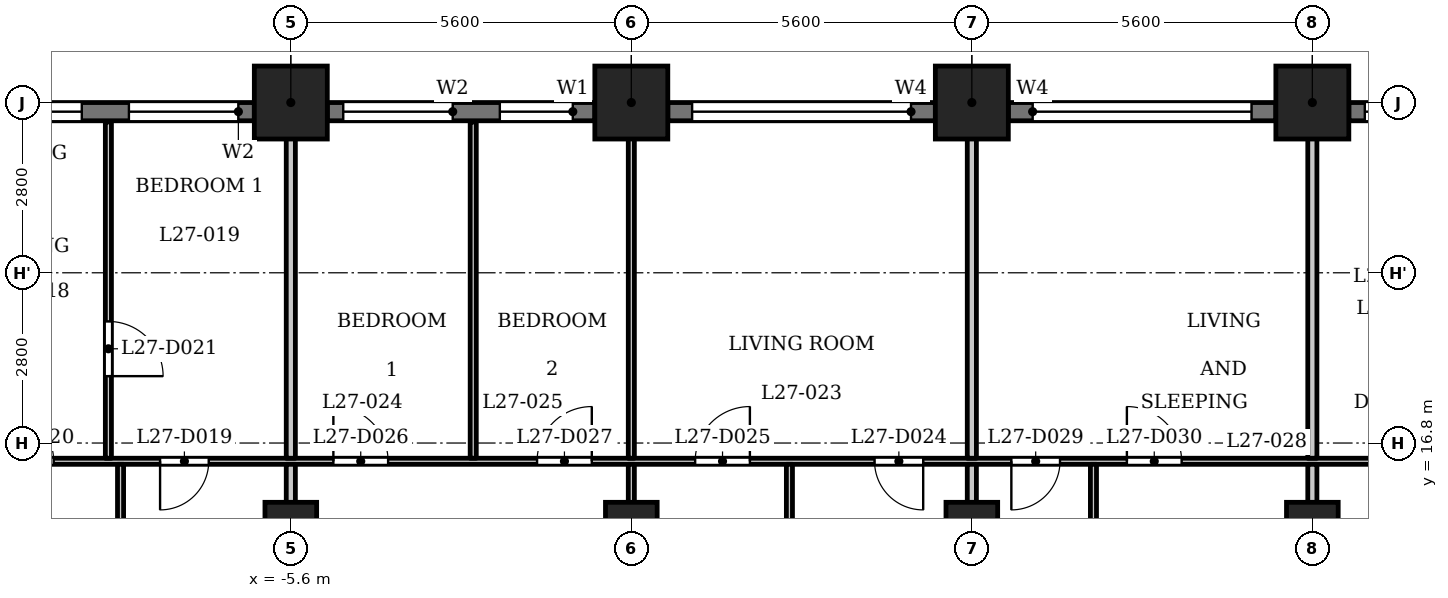
"""IFC4 building model, lengths in metres.
Left out: names, types, materials, properties, quantities, classifications, styles, units other than length and angle.
Written with IfcOpenShell. Run it as: python <this file> out.ifc"""

import sys

from ifc_helpers import new_model, si_unit, direction, frame, frame_2d, origin, origin_2d, place, context, subcontext, project, spatial, rectangle, extrude, element, fill, save


model = new_model("IFC4")
c1 = context("Model", 3, precision=1e-05, world=origin(), true_north=direction((0.0, 1.0)))
c2 = subcontext(c1, "Body", "Model", "MODEL_VIEW")
j1 = project(units=[si_unit("LENGTHUNIT", "METRE"), si_unit("PLANEANGLEUNIT", "RADIAN")], contexts=[c1])
p1 = place(None, origin())
s1 = spatial("IfcSite", under=j1, at=p1, CompositionType="ELEMENT")
p2 = place(p1, origin())
s2 = spatial("IfcBuilding", under=s1, at=p2, CompositionType="ELEMENT")
p3 = place(p2, frame((0.0, 0.0, 107.8)))
s3 = spatial("IfcBuildingStorey", under=s2, at=p3, CompositionType="ELEMENT", Elevation=107.8)
for number, where, z_axis, x_axis in (
    (1, (11.2, 22.4, 0.0), (0.0, 0.0, 1.0), (1.0, 0.0, 0.0)),
    (2, (5.6, 22.4, 0.0), (0.0, 0.0, 1.0), (1.0, 0.0, 0.0)),
    (3, (0.0, 22.4, 0.0), (0.0, 0.0, 1.0), (1.0, 0.0, 0.0)),
    (4, (-5.6, 22.4, 0.0), (0.0, 0.0, 1.0), (1.0, 0.0, 0.0)),
):
    element("IfcColumn", number, at=place(p3, frame(where, z_axis=z_axis, x_axis=x_axis)), inside=s3, PredefinedType="COLUMN", context=c2, shape_type="SweptSolid", body=[
        extrude(rectangle(XDim=1.2, YDim=1.2, at=origin_2d()), origin(), (0.0, 0.0, 1.0), 3.5),
    ])
for number, where, z_axis, x_axis in (
    (5, (-5.6, 15.4, 0.0), (0.0, 0.0, 1.0), (1.0, 0.0, 0.0)),
    (6, (0.0, 15.4, 0.0), (0.0, 0.0, 1.0), (1.0, 0.0, 0.0)),
    (7, (5.6, 15.4, 0.0), (0.0, 0.0, 1.0), (1.0, 0.0, 0.0)),
    (8, (11.2, 15.4, 0.0), (0.0, 0.0, 1.0), (1.0, 0.0, 0.0)),
):
    element("IfcColumn", number, at=place(p3, frame(where, z_axis=z_axis, x_axis=x_axis)), inside=s3, PredefinedType="COLUMN", context=c2, shape_type="SweptSolid", body=[
        extrude(rectangle(XDim=0.85, YDim=0.85, at=origin_2d()), origin(), (0.0, 0.0, 1.0), 3.5),
    ])
p4 = place(p3, frame((16.2, 22.25, 0.0), z_axis=(0.0, 0.0, 1.0), x_axis=(-1.0, 0.0, 0.0)))
e9 = element("IfcWall", 9, at=p4, inside=s3, PredefinedType="SOLIDWALL", context=c2, shape_type="SweptSolid", body=[
    extrude(rectangle(XDim=4.4, YDim=0.3, at=frame_2d((2.2, 0.0))), origin(), (0.0, 0.0, 1.0), 2.4),
])
p5 = place(p4, frame((0.363, 0.0, 0.6)))
e10 = element("IfcOpeningElement", 10, at=p5, cuts=e9, PredefinedType="OPENING", context=c2, shape_type="SweptSolid", body=[
    extrude(rectangle(XDim=1.2, YDim=1.55, at=frame_2d((0.6, 0.775))), frame((0.0, 0.16, 0.0), z_axis=(0.0, -1.0, 0.0), x_axis=(1.0, 0.0, 0.0)), (0.0, 0.0, 1.0), 0.32),
])
p6 = place(p4, frame((2.337, 0.0, 0.9)))
e11 = element("IfcOpeningElement", 11, at=p6, cuts=e9, PredefinedType="OPENING", context=c2, shape_type="SweptSolid", body=[
    extrude(rectangle(XDim=1.8, YDim=1.25, at=frame_2d((0.9, 0.625))), frame((0.0, 0.16, 0.0), z_axis=(0.0, -1.0, 0.0), x_axis=(1.0, 0.0, 0.0)), (0.0, 0.0, 1.0), 0.32),
])
p7 = place(p3, frame((10.6, 22.25, 0.0), z_axis=(0.0, 0.0, 1.0), x_axis=(-1.0, 0.0, 0.0)))
e12 = element("IfcWall", 12, at=p7, inside=s3, PredefinedType="SOLIDWALL", context=c2, shape_type="SweptSolid", body=[
    extrude(rectangle(XDim=4.4, YDim=0.3, at=frame_2d((2.2, 0.0))), origin(), (0.0, 0.0, 1.0), 2.4),
])
p8 = place(p7, frame((0.4, 0.0, 1.2)))
e13 = element("IfcOpeningElement", 13, at=p8, cuts=e12, PredefinedType="OPENING", context=c2, shape_type="SweptSolid", body=[
    extrude(rectangle(XDim=3.6, YDim=0.95, at=frame_2d((1.8, 0.475))), frame((0.0, 0.16, 0.0), z_axis=(0.0, -1.0, 0.0), x_axis=(1.0, 0.0, 0.0)), (0.0, 0.0, 1.0), 0.32),
])
p9 = place(p3, frame((5.0, 22.25, 0.0), z_axis=(0.0, 0.0, 1.0), x_axis=(-1.0, 0.0, 0.0)))
e14 = element("IfcWall", 14, at=p9, inside=s3, PredefinedType="SOLIDWALL", context=c2, shape_type="SweptSolid", body=[
    extrude(rectangle(XDim=4.4, YDim=0.3, at=frame_2d((2.2, 0.0))), origin(), (0.0, 0.0, 1.0), 2.4),
])
p10 = place(p9, frame((0.4, 0.0, 1.2)))
e15 = element("IfcOpeningElement", 15, at=p10, cuts=e14, PredefinedType="OPENING", context=c2, shape_type="SweptSolid", body=[
    extrude(rectangle(XDim=3.6, YDim=0.95, at=frame_2d((1.8, 0.475))), frame((0.0, 0.16, 0.0), z_axis=(0.0, -1.0, 0.0), x_axis=(1.0, 0.0, 0.0)), (0.0, 0.0, 1.0), 0.32),
])
p11 = place(p3, frame((-0.6, 22.25, 0.0), z_axis=(0.0, 0.0, 1.0), x_axis=(-1.0, 0.0, 0.0)))
e16 = element("IfcWall", 16, at=p11, inside=s3, PredefinedType="SOLIDWALL", context=c2, shape_type="SweptSolid", body=[
    extrude(rectangle(XDim=4.4, YDim=0.3, at=frame_2d((2.2, 0.0))), origin(), (0.0, 0.0, 1.0), 2.4),
])
p12 = place(p11, frame((0.363, 0.0, 0.6)))
e17 = element("IfcOpeningElement", 17, at=p12, cuts=e16, PredefinedType="OPENING", context=c2, shape_type="SweptSolid", body=[
    extrude(rectangle(XDim=1.2, YDim=1.55, at=frame_2d((0.6, 0.775))), frame((0.0, 0.16, 0.0), z_axis=(0.0, -1.0, 0.0), x_axis=(1.0, 0.0, 0.0)), (0.0, 0.0, 1.0), 0.32),
])
p13 = place(p11, frame((2.337, 0.0, 0.9)))
e18 = element("IfcOpeningElement", 18, at=p13, cuts=e16, PredefinedType="OPENING", context=c2, shape_type="SweptSolid", body=[
    extrude(rectangle(XDim=1.8, YDim=1.25, at=frame_2d((0.9, 0.625))), frame((0.0, 0.16, 0.0), z_axis=(0.0, -1.0, 0.0), x_axis=(1.0, 0.0, 0.0)), (0.0, 0.0, 1.0), 0.32),
])
p14 = place(p3, frame((-6.2, 22.25, 0.0), z_axis=(0.0, 0.0, 1.0), x_axis=(-1.0, 0.0, 0.0)))
e19 = element("IfcWall", 19, at=p14, inside=s3, PredefinedType="SOLIDWALL", context=c2, shape_type="SweptSolid", body=[
    extrude(rectangle(XDim=4.4, YDim=0.3, at=frame_2d((2.2, 0.0))), origin(), (0.0, 0.0, 1.0), 2.4),
])
p15 = place(p14, frame((0.262, 0.0, 0.9)))
e20 = element("IfcOpeningElement", 20, at=p15, cuts=e19, PredefinedType="OPENING", context=c2, shape_type="SweptSolid", body=[
    extrude(rectangle(XDim=1.8, YDim=1.25, at=frame_2d((0.9, 0.625))), frame((0.0, 0.16, 0.0), z_axis=(0.0, -1.0, 0.0), x_axis=(1.0, 0.0, 0.0)), (0.0, 0.0, 1.0), 0.32),
])
p16 = place(p14, frame((2.837, 0.0, 0.6)))
e21 = element("IfcOpeningElement", 21, at=p16, cuts=e19, PredefinedType="OPENING", context=c2, shape_type="SweptSolid", body=[
    extrude(rectangle(XDim=1.2, YDim=1.55, at=frame_2d((0.6, 0.775))), frame((0.0, 0.16, 0.0), z_axis=(0.0, -1.0, 0.0), x_axis=(1.0, 0.0, 0.0)), (0.0, 0.0, 1.0), 0.32),
])
p17 = place(p3, frame((-16.725, 16.5, 0.0), z_axis=(0.0, 0.0, 1.0), x_axis=(1.0, 0.0, 0.0)))
e22 = element("IfcWall", 22, at=p17, inside=s3, PredefinedType="PARTITIONING", context=c2, shape_type="SweptSolid", body=[
    extrude(rectangle(XDim=33.45, YDim=0.1, at=frame_2d((16.725, 0.0))), origin(), (0.0, 0.0, 1.0), 3.2),
])
p18 = place(p17, frame((1.075, 0.0, 0.0)))
e23 = element("IfcOpeningElement", 23, at=p18, cuts=e22, PredefinedType="OPENING", context=c2, shape_type="SweptSolid", body=[
    extrude(rectangle(XDim=0.8, YDim=2.1, at=frame_2d((0.4, 1.05))), frame((0.0, 0.06, 0.0), z_axis=(0.0, -1.0, 0.0), x_axis=(1.0, 0.0, 0.0)), (0.0, 0.0, 1.0), 0.12),
])
p19 = place(p17, frame((3.975, 0.0, 0.0)))
e24 = element("IfcOpeningElement", 24, at=p19, cuts=e22, PredefinedType="OPENING", context=c2, shape_type="SweptSolid", body=[
    extrude(rectangle(XDim=0.9, YDim=2.1, at=frame_2d((0.45, 1.05))), frame((0.0, 0.06, 0.0), z_axis=(0.0, -1.0, 0.0), x_axis=(1.0, 0.0, 0.0)), (0.0, 0.0, 1.0), 0.12),
])
p20 = place(p17, frame((8.975, 0.0, 0.0)))
e25 = element("IfcOpeningElement", 25, at=p20, cuts=e22, PredefinedType="OPENING", context=c2, shape_type="SweptSolid", body=[
    extrude(rectangle(XDim=0.8, YDim=2.1, at=frame_2d((0.4, 1.05))), frame((0.0, 0.06, 0.0), z_axis=(0.0, -1.0, 0.0), x_axis=(1.0, 0.0, 0.0)), (0.0, 0.0, 1.0), 0.12),
])
p21 = place(p17, frame((6.325, 0.0, 0.0)))
e26 = element("IfcOpeningElement", 26, at=p21, cuts=e22, PredefinedType="OPENING", context=c2, shape_type="SweptSolid", body=[
    extrude(rectangle(XDim=0.9, YDim=2.1, at=frame_2d((0.45, 1.05))), frame((0.0, 0.06, 0.0), z_axis=(0.0, -1.0, 0.0), x_axis=(1.0, 0.0, 0.0)), (0.0, 0.0, 1.0), 0.12),
])
p22 = place(p17, frame((20.725, 0.0, 0.0)))
e27 = element("IfcOpeningElement", 27, at=p22, cuts=e22, PredefinedType="OPENING", context=c2, shape_type="SweptSolid", body=[
    extrude(rectangle(XDim=0.8, YDim=2.1, at=frame_2d((0.4, 1.05))), frame((0.0, 0.06, 0.0), z_axis=(0.0, -1.0, 0.0), x_axis=(1.0, 0.0, 0.0)), (0.0, 0.0, 1.0), 0.12),
])
p23 = place(p17, frame((17.775, 0.0, 0.0)))
e28 = element("IfcOpeningElement", 28, at=p23, cuts=e22, PredefinedType="OPENING", context=c2, shape_type="SweptSolid", body=[
    extrude(rectangle(XDim=0.9, YDim=2.1, at=frame_2d((0.45, 1.05))), frame((0.0, 0.06, 0.0), z_axis=(0.0, -1.0, 0.0), x_axis=(1.0, 0.0, 0.0)), (0.0, 0.0, 1.0), 0.12),
])
p24 = place(p17, frame((11.825, 0.0, 0.0)))
e29 = element("IfcOpeningElement", 29, at=p24, cuts=e22, PredefinedType="OPENING", context=c2, shape_type="SweptSolid", body=[
    extrude(rectangle(XDim=0.9, YDim=2.1, at=frame_2d((0.45, 1.05))), frame((0.0, 0.06, 0.0), z_axis=(0.0, -1.0, 0.0), x_axis=(1.0, 0.0, 0.0)), (0.0, 0.0, 1.0), 0.12),
])
p25 = place(p17, frame((15.175, 0.0, 0.0)))
e30 = element("IfcOpeningElement", 30, at=p25, cuts=e22, PredefinedType="OPENING", context=c2, shape_type="SweptSolid", body=[
    extrude(rectangle(XDim=0.9, YDim=2.1, at=frame_2d((0.45, 1.05))), frame((0.0, 0.06, 0.0), z_axis=(0.0, -1.0, 0.0), x_axis=(1.0, 0.0, 0.0)), (0.0, 0.0, 1.0), 0.12),
])
p26 = place(p17, frame((22.975, 0.0, 0.0)))
e31 = element("IfcOpeningElement", 31, at=p26, cuts=e22, PredefinedType="OPENING", context=c2, shape_type="SweptSolid", body=[
    extrude(rectangle(XDim=0.8, YDim=2.1, at=frame_2d((0.4, 1.05))), frame((0.0, 0.06, 0.0), z_axis=(0.0, -1.0, 0.0), x_axis=(1.0, 0.0, 0.0)), (0.0, 0.0, 1.0), 0.12),
])
p27 = place(p17, frame((24.875, 0.0, 0.0)))
e32 = element("IfcOpeningElement", 32, at=p27, cuts=e22, PredefinedType="OPENING", context=c2, shape_type="SweptSolid", body=[
    extrude(rectangle(XDim=0.9, YDim=2.1, at=frame_2d((0.45, 1.05))), frame((0.0, 0.06, 0.0), z_axis=(0.0, -1.0, 0.0), x_axis=(1.0, 0.0, 0.0)), (0.0, 0.0, 1.0), 0.12),
])
p28 = place(p17, frame((32.075, 0.0, 0.0)))
e33 = element("IfcOpeningElement", 33, at=p28, cuts=e22, PredefinedType="OPENING", context=c2, shape_type="SweptSolid", body=[
    extrude(rectangle(XDim=0.8, YDim=2.1, at=frame_2d((0.4, 1.05))), frame((0.0, 0.06, 0.0), z_axis=(0.0, -1.0, 0.0), x_axis=(1.0, 0.0, 0.0)), (0.0, 0.0, 1.0), 0.12),
])
p29 = place(p17, frame((29.175, 0.0, 0.0)))
e34 = element("IfcOpeningElement", 34, at=p29, cuts=e22, PredefinedType="OPENING", context=c2, shape_type="SweptSolid", body=[
    extrude(rectangle(XDim=0.9, YDim=2.1, at=frame_2d((0.45, 1.05))), frame((0.0, 0.06, 0.0), z_axis=(0.0, -1.0, 0.0), x_axis=(1.0, 0.0, 0.0)), (0.0, 0.0, 1.0), 0.12),
])
p30 = place(p3, frame((-8.6, 16.55, 0.0), z_axis=(0.0, 0.0, 1.0), x_axis=(0.0, 1.0, 0.0)))
e35 = element("IfcWall", 35, at=p30, inside=s3, PredefinedType="PARTITIONING", context=c2, shape_type="SweptSolid", body=[
    extrude(rectangle(XDim=5.53, YDim=0.1, at=frame_2d((2.765, 0.0))), origin(), (0.0, 0.0, 1.0), 3.2),
])
p31 = place(p30, frame((1.35, 0.0, 0.0)))
e36 = element("IfcOpeningElement", 36, at=p31, cuts=e35, PredefinedType="OPENING", context=c2, shape_type="SweptSolid", body=[
    extrude(rectangle(XDim=0.9, YDim=2.1, at=frame_2d((0.45, 1.05))), frame((0.0, 0.06, 0.0), z_axis=(0.0, -1.0, 0.0), x_axis=(1.0, 0.0, 0.0)), (0.0, 0.0, 1.0), 0.12),
])
p32 = place(p3, frame((-8.4, 13.275, 0.0), z_axis=(0.0, 0.0, 1.0), x_axis=(0.0, 1.0, 0.0)))
e37 = element("IfcWall", 37, at=p32, inside=s3, PredefinedType="PARTITIONING", context=c2, shape_type="SweptSolid", body=[
    extrude(rectangle(XDim=3.175, YDim=0.1, at=frame_2d((1.587, 0.0))), origin(), (0.0, 0.0, 1.0), 3.2),
])
p33 = place(p3, frame((-5.6, 13.275, 0.0), z_axis=(0.0, 0.0, 1.0), x_axis=(0.0, 1.0, 0.0)))
e38 = element("IfcWall", 38, at=p33, inside=s3, PredefinedType="PARTITIONING", context=c2, shape_type="SweptSolid", body=[
    extrude(rectangle(XDim=3.175, YDim=0.15, at=frame_2d((1.587, 0.0))), origin(), (0.0, 0.0, 1.0), 3.2),
])
p34 = place(p3, frame((-5.6, 16.55, 0.0), z_axis=(0.0, 0.0, 1.0), x_axis=(0.0, 1.0, 0.0)))
e39 = element("IfcWall", 39, at=p34, inside=s3, PredefinedType="PARTITIONING", context=c2, shape_type="SweptSolid", body=[
    extrude(rectangle(XDim=6.43, YDim=0.15, at=frame_2d((3.215, 0.0))), origin(), (0.0, 0.0, 1.0), 3.2),
])
p35 = place(p3, frame((-2.6, 16.55, 0.0), z_axis=(0.0, 0.0, 1.0), x_axis=(0.0, 1.0, 0.0)))
e40 = element("IfcWall", 40, at=p35, inside=s3, PredefinedType="PARTITIONING", context=c2, shape_type="SweptSolid", body=[
    extrude(rectangle(XDim=5.53, YDim=0.1, at=frame_2d((2.765, 0.0))), origin(), (0.0, 0.0, 1.0), 3.2),
])
p36 = place(p3, frame((0.0, 13.275, 0.0), z_axis=(0.0, 0.0, 1.0), x_axis=(0.0, 1.0, 0.0)))
e41 = element("IfcWall", 41, at=p36, inside=s3, PredefinedType="PARTITIONING", context=c2, shape_type="SweptSolid", body=[
    extrude(rectangle(XDim=3.175, YDim=0.1, at=frame_2d((1.587, 0.0))), origin(), (0.0, 0.0, 1.0), 3.2),
])
p37 = place(p36, frame((0.576, 0.0, 0.0)))
e42 = element("IfcOpeningElement", 42, at=p37, cuts=e41, PredefinedType="OPENING", context=c2, shape_type="SweptSolid", body=[
    extrude(rectangle(XDim=0.9, YDim=2.1, at=frame_2d((0.45, 1.05))), frame((0.0, 0.06, 0.0), z_axis=(0.0, -1.0, 0.0), x_axis=(1.0, 0.0, 0.0)), (0.0, 0.0, 1.0), 0.12),
])
p38 = place(p3, frame((0.0, 16.55, 0.0), z_axis=(0.0, 0.0, 1.0), x_axis=(0.0, 1.0, 0.0)))
e43 = element("IfcWall", 43, at=p38, inside=s3, PredefinedType="PARTITIONING", context=c2, shape_type="SweptSolid", body=[
    extrude(rectangle(XDim=6.43, YDim=0.1, at=frame_2d((3.215, 0.0))), origin(), (0.0, 0.0, 1.0), 3.2),
])
p39 = place(p3, frame((2.6, 13.275, 0.0), z_axis=(0.0, 0.0, 1.0), x_axis=(0.0, 1.0, 0.0)))
e44 = element("IfcWall", 44, at=p39, inside=s3, PredefinedType="PARTITIONING", context=c2, shape_type="SweptSolid", body=[
    extrude(rectangle(XDim=3.175, YDim=0.1, at=frame_2d((1.587, 0.0))), origin(), (0.0, 0.0, 1.0), 3.2),
])
p40 = place(p3, frame((5.6, 13.275, 0.0), z_axis=(0.0, 0.0, 1.0), x_axis=(0.0, 1.0, 0.0)))
e45 = element("IfcWall", 45, at=p40, inside=s3, PredefinedType="PARTITIONING", context=c2, shape_type="SweptSolid", body=[
    extrude(rectangle(XDim=3.175, YDim=0.15, at=frame_2d((1.587, 0.0))), origin(), (0.0, 0.0, 1.0), 3.2),
])
p41 = place(p3, frame((5.6, 16.55, 0.0), z_axis=(0.0, 0.0, 1.0), x_axis=(0.0, 1.0, 0.0)))
e46 = element("IfcWall", 46, at=p41, inside=s3, PredefinedType="PARTITIONING", context=c2, shape_type="SweptSolid", body=[
    extrude(rectangle(XDim=6.43, YDim=0.15, at=frame_2d((3.215, 0.0))), origin(), (0.0, 0.0, 1.0), 3.2),
])
p42 = place(p3, frame((7.6, 13.275, 0.0), z_axis=(0.0, 0.0, 1.0), x_axis=(0.0, 1.0, 0.0)))
e47 = element("IfcWall", 47, at=p42, inside=s3, PredefinedType="PARTITIONING", context=c2, shape_type="SweptSolid", body=[
    extrude(rectangle(XDim=3.175, YDim=0.1, at=frame_2d((1.587, 0.0))), origin(), (0.0, 0.0, 1.0), 3.2),
])
p43 = place(p3, frame((11.2, 13.275, 0.0), z_axis=(0.0, 0.0, 1.0), x_axis=(0.0, 1.0, 0.0)))
e48 = element("IfcWall", 48, at=p43, inside=s3, PredefinedType="PARTITIONING", context=c2, shape_type="SweptSolid", body=[
    extrude(rectangle(XDim=3.175, YDim=0.15, at=frame_2d((1.587, 0.0))), origin(), (0.0, 0.0, 1.0), 3.2),
])
p44 = place(p3, frame((11.2, 16.55, 0.0), z_axis=(0.0, 0.0, 1.0), x_axis=(0.0, 1.0, 0.0)))
e49 = element("IfcWall", 49, at=p44, inside=s3, PredefinedType="PARTITIONING", context=c2, shape_type="SweptSolid", body=[
    extrude(rectangle(XDim=6.43, YDim=0.15, at=frame_2d((3.215, 0.0))), origin(), (0.0, 0.0, 1.0), 3.2),
])
p45 = place(p20, origin())
e50 = element("IfcDoor", 50, at=p45, inside=s3, OperationType="SINGLE_SWING_LEFT", PredefinedType="DOOR", context=c2, shape_type="SweptSolid", body=[
    extrude(rectangle(XDim=0.8, YDim=2.1, at=frame_2d((0.4, 1.05))), frame((0.0, 0.025, 0.0), z_axis=(0.0, -1.0, 0.0), x_axis=(1.0, 0.0, 0.0)), (0.0, 0.0, 1.0), 0.05),
])
fill(e25, e50)
p46 = place(p21, origin())
e51 = element("IfcDoor", 51, at=p46, inside=s3, OperationType="SINGLE_SWING_RIGHT", PredefinedType="DOOR", context=c2, shape_type="SweptSolid", body=[
    extrude(rectangle(XDim=0.9, YDim=2.1, at=frame_2d((0.45, 1.05))), frame((0.0, 0.025, 0.0), z_axis=(0.0, -1.0, 0.0), x_axis=(1.0, 0.0, 0.0)), (0.0, 0.0, 1.0), 0.05),
])
fill(e26, e51)
p47 = place(p31, origin())
e52 = element("IfcDoor", 52, at=p47, inside=s3, OperationType="SINGLE_SWING_LEFT", PredefinedType="DOOR", context=c2, shape_type="SweptSolid", body=[
    extrude(rectangle(XDim=0.9, YDim=2.1, at=frame_2d((0.45, 1.05))), frame((0.0, 0.025, 0.0), z_axis=(0.0, -1.0, 0.0), x_axis=(1.0, 0.0, 0.0)), (0.0, 0.0, 1.0), 0.05),
])
fill(e36, e52)
p48 = place(p22, origin())
e53 = element("IfcDoor", 53, at=p48, inside=s3, OperationType="SINGLE_SWING_RIGHT", PredefinedType="DOOR", context=c2, shape_type="SweptSolid", body=[
    extrude(rectangle(XDim=0.8, YDim=2.1, at=frame_2d((0.4, 1.05))), frame((0.0, 0.025, 0.0), z_axis=(0.0, -1.0, 0.0), x_axis=(1.0, 0.0, 0.0)), (0.0, 0.0, 1.0), 0.05),
])
fill(e27, e53)
p49 = place(p23, origin())
e54 = element("IfcDoor", 54, at=p49, inside=s3, OperationType="SINGLE_SWING_LEFT", PredefinedType="DOOR", context=c2, shape_type="SweptSolid", body=[
    extrude(rectangle(XDim=0.9, YDim=2.1, at=frame_2d((0.45, 1.05))), frame((0.0, 0.025, 0.0), z_axis=(0.0, -1.0, 0.0), x_axis=(1.0, 0.0, 0.0)), (0.0, 0.0, 1.0), 0.05),
])
fill(e28, e54)
p50 = place(p24, origin())
e55 = element("IfcDoor", 55, at=p50, inside=s3, OperationType="SINGLE_SWING_RIGHT", PredefinedType="DOOR", context=c2, shape_type="SweptSolid", body=[
    extrude(rectangle(XDim=0.9, YDim=2.1, at=frame_2d((0.45, 1.05))), frame((0.0, 0.025, 0.0), z_axis=(0.0, -1.0, 0.0), x_axis=(1.0, 0.0, 0.0)), (0.0, 0.0, 1.0), 0.05),
])
fill(e29, e55)
p51 = place(p25, origin())
e56 = element("IfcDoor", 56, at=p51, inside=s3, OperationType="SINGLE_SWING_LEFT", PredefinedType="DOOR", context=c2, shape_type="SweptSolid", body=[
    extrude(rectangle(XDim=0.9, YDim=2.1, at=frame_2d((0.45, 1.05))), frame((0.0, 0.025, 0.0), z_axis=(0.0, -1.0, 0.0), x_axis=(1.0, 0.0, 0.0)), (0.0, 0.0, 1.0), 0.05),
])
fill(e30, e56)
p52 = place(p26, origin())
e57 = element("IfcDoor", 57, at=p52, inside=s3, OperationType="SINGLE_SWING_LEFT", PredefinedType="DOOR", context=c2, shape_type="SweptSolid", body=[
    extrude(rectangle(XDim=0.8, YDim=2.1, at=frame_2d((0.4, 1.05))), frame((0.0, 0.025, 0.0), z_axis=(0.0, -1.0, 0.0), x_axis=(1.0, 0.0, 0.0)), (0.0, 0.0, 1.0), 0.05),
])
fill(e31, e57)
p53 = place(p27, origin())
e58 = element("IfcDoor", 58, at=p53, inside=s3, OperationType="SINGLE_SWING_RIGHT", PredefinedType="DOOR", context=c2, shape_type="SweptSolid", body=[
    extrude(rectangle(XDim=0.9, YDim=2.1, at=frame_2d((0.45, 1.05))), frame((0.0, 0.025, 0.0), z_axis=(0.0, -1.0, 0.0), x_axis=(1.0, 0.0, 0.0)), (0.0, 0.0, 1.0), 0.05),
])
fill(e32, e58)
p54 = place(p6, origin())
e59 = element("IfcWindow", 59, at=p54, inside=s3, PartitioningType="SINGLE_PANEL", PredefinedType="WINDOW", context=c2, shape_type="SweptSolid", body=[
    extrude(rectangle(XDim=1.8, YDim=1.25, at=frame_2d((0.9, 0.625))), frame((0.0, 0.03, 0.0), z_axis=(0.0, -1.0, 0.0), x_axis=(1.0, 0.0, 0.0)), (0.0, 0.0, 1.0), 0.06),
])
fill(e11, e59)
p55 = place(p8, origin())
e60 = element("IfcWindow", 60, at=p55, inside=s3, PartitioningType="SINGLE_PANEL", PredefinedType="WINDOW", context=c2, shape_type="SweptSolid", body=[
    extrude(rectangle(XDim=3.6, YDim=0.95, at=frame_2d((1.8, 0.475))), frame((0.0, 0.03, 0.0), z_axis=(0.0, -1.0, 0.0), x_axis=(1.0, 0.0, 0.0)), (0.0, 0.0, 1.0), 0.06),
])
fill(e13, e60)
p56 = place(p10, origin())
e61 = element("IfcWindow", 61, at=p56, inside=s3, PartitioningType="SINGLE_PANEL", PredefinedType="WINDOW", context=c2, shape_type="SweptSolid", body=[
    extrude(rectangle(XDim=3.6, YDim=0.95, at=frame_2d((1.8, 0.475))), frame((0.0, 0.03, 0.0), z_axis=(0.0, -1.0, 0.0), x_axis=(1.0, 0.0, 0.0)), (0.0, 0.0, 1.0), 0.06),
])
fill(e15, e61)
p57 = place(p12, origin())
e62 = element("IfcWindow", 62, at=p57, inside=s3, PartitioningType="SINGLE_PANEL", PredefinedType="WINDOW", context=c2, shape_type="SweptSolid", body=[
    extrude(rectangle(XDim=1.2, YDim=1.55, at=frame_2d((0.6, 0.775))), frame((0.0, 0.03, 0.0), z_axis=(0.0, -1.0, 0.0), x_axis=(1.0, 0.0, 0.0)), (0.0, 0.0, 1.0), 0.06),
])
fill(e17, e62)
p58 = place(p13, origin())
e63 = element("IfcWindow", 63, at=p58, inside=s3, PartitioningType="SINGLE_PANEL", PredefinedType="WINDOW", context=c2, shape_type="SweptSolid", body=[
    extrude(rectangle(XDim=1.8, YDim=1.25, at=frame_2d((0.9, 0.625))), frame((0.0, 0.03, 0.0), z_axis=(0.0, -1.0, 0.0), x_axis=(1.0, 0.0, 0.0)), (0.0, 0.0, 1.0), 0.06),
])
fill(e18, e63)
p59 = place(p15, origin())
e64 = element("IfcWindow", 64, at=p59, inside=s3, PartitioningType="SINGLE_PANEL", PredefinedType="WINDOW", context=c2, shape_type="SweptSolid", body=[
    extrude(rectangle(XDim=1.8, YDim=1.25, at=frame_2d((0.9, 0.625))), frame((0.0, 0.03, 0.0), z_axis=(0.0, -1.0, 0.0), x_axis=(1.0, 0.0, 0.0)), (0.0, 0.0, 1.0), 0.06),
])
fill(e20, e64)
p60 = place(p16, origin())
e65 = element("IfcWindow", 65, at=p60, inside=s3, PartitioningType="SINGLE_PANEL", PredefinedType="WINDOW", context=c2, shape_type="SweptSolid", body=[
    extrude(rectangle(XDim=1.2, YDim=1.55, at=frame_2d((0.6, 0.775))), frame((0.0, 0.03, 0.0), z_axis=(0.0, -1.0, 0.0), x_axis=(1.0, 0.0, 0.0)), (0.0, 0.0, 1.0), 0.06),
])
fill(e21, e65)
save(model, sys.argv[1])
